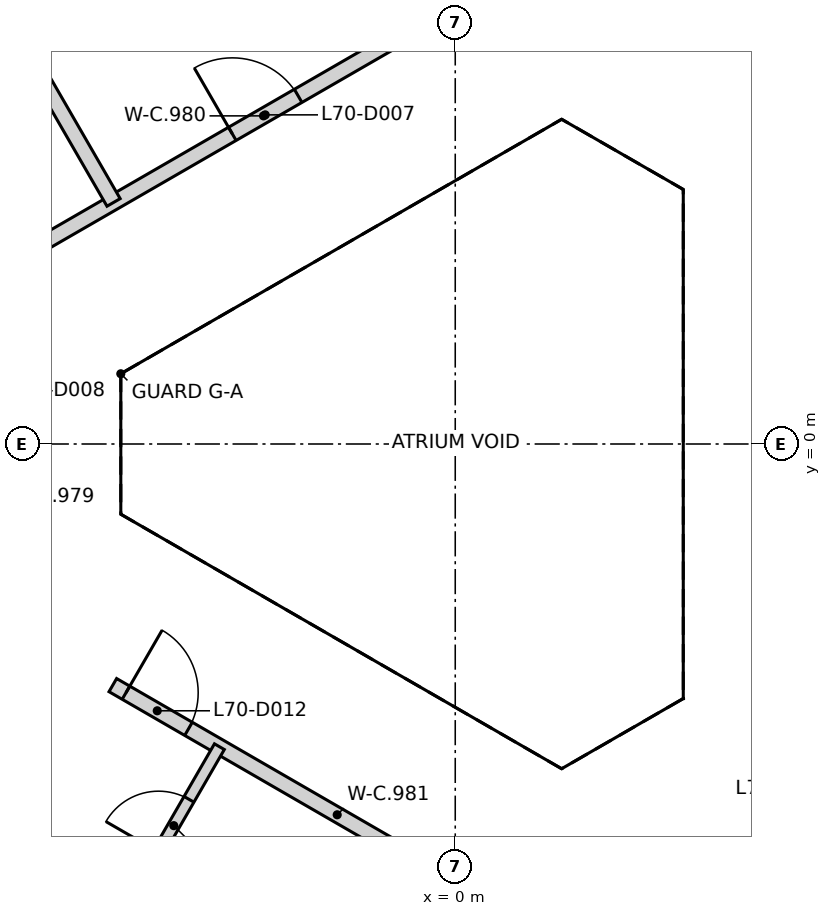
"""IFC4 building model, lengths in metres.
Left out: names, types, materials, properties, quantities, classifications, styles, units other than length and angle.
Written with IfcOpenShell. Run it as: python <this file> out.ifc"""

import sys

from ifc_helpers import new_model, si_unit, direction, frame, frame_2d, origin, place, context, subcontext, project, spatial, rectangle, extrude, element, fill, save


model = new_model("IFC4")
c1 = context("Model", 3, precision=1e-05, world=origin(), true_north=direction((0.0, 1.0)))
c2 = subcontext(c1, "Body", "Model", "MODEL_VIEW")
j1 = project(units=[si_unit("LENGTHUNIT", "METRE"), si_unit("PLANEANGLEUNIT", "RADIAN")], contexts=[c1])
p1 = place(None, origin())
s1 = spatial("IfcSite", under=j1, at=p1, CompositionType="ELEMENT")
p2 = place(p1, origin())
s2 = spatial("IfcBuilding", under=s1, at=p2, CompositionType="ELEMENT")
p3 = place(p2, frame((0.0, 0.0, 276.6)))
s3 = spatial("IfcBuildingStorey", under=s2, at=p3, CompositionType="ELEMENT", Elevation=276.6)
p4 = place(p3, frame((-6.4, 2.079, 0.0), z_axis=(0.0, 0.0, 1.0), x_axis=(0.866044821263, 0.499966366432, 0.0)))
e1 = element("IfcWall", 1, at=p4, inside=s3, PredefinedType="PARTITIONING", context=c2, shape_type="SweptSolid", body=[
    extrude(rectangle(XDim=8.953, YDim=0.2, at=frame_2d((4.477, 0.0))), origin(), (0.0, 0.0, 1.0), 3.25),
])
p5 = place(p4, frame((4.003, 0.0, 0.0)))
e2 = element("IfcOpeningElement", 2, at=p5, cuts=e1, PredefinedType="OPENING", context=c2, shape_type="SweptSolid", body=[
    extrude(rectangle(XDim=1.0, YDim=2.1, at=frame_2d((0.5, 1.05))), frame((0.0, 0.11, 0.0), z_axis=(0.0, -1.0, 0.0), x_axis=(1.0, 0.0, 0.0)), (0.0, 0.0, 1.0), 0.22),
])
p6 = place(p3, frame((-4.505, -3.172, 0.0), z_axis=(0.0, 0.0, 1.0), x_axis=(0.865815783666, -0.500362897061, 0.0)))
e3 = element("IfcWall", 3, at=p6, inside=s3, PredefinedType="PARTITIONING", context=c2, shape_type="SweptSolid", body=[
    extrude(rectangle(XDim=6.819, YDim=0.2, at=frame_2d((3.409, 0.0))), origin(), (0.0, 0.0, 1.0), 3.25),
])
p7 = place(p6, frame((0.2, 0.0, 0.0)))
e4 = element("IfcOpeningElement", 4, at=p7, cuts=e3, PredefinedType="OPENING", context=c2, shape_type="SweptSolid", body=[
    extrude(rectangle(XDim=0.95, YDim=2.1, at=frame_2d((0.475, 1.05))), frame((0.0, 0.11, 0.0), z_axis=(0.0, -1.0, 0.0), x_axis=(1.0, 0.0, 0.0)), (0.0, 0.0, 1.0), 0.22),
])
p8 = place(p3, frame((-11.035, 14.505, 0.0), z_axis=(0.0, 0.0, 1.0), x_axis=(0.499989597041, -0.866031409852, 0.0)))
e5 = element("IfcWall", 5, at=p8, inside=s3, PredefinedType="PARTITIONING", context=c2, shape_type="SweptSolid", body=[
    extrude(rectangle(XDim=13.079, YDim=0.2, at=frame_2d((6.54, 0.0))), origin(), (0.0, 0.0, 1.0), 3.25),
])
p9 = place(p3, frame((-4.303, -6.06, 0.0), z_axis=(0.0, 0.0, 1.0), x_axis=(0.500045362686, 0.865999212041, 0.0)))
e6 = element("IfcWall", 6, at=p9, inside=s3, PredefinedType="PARTITIONING", context=c2, shape_type="SweptSolid", body=[
    extrude(rectangle(XDim=2.4, YDim=0.15, at=frame_2d((1.2, 0.0))), origin(), (0.0, 0.0, 1.0), 3.25),
])
p10 = place(p9, frame((0.8, 0.0, 0.0)))
e7 = element("IfcOpeningElement", 7, at=p10, cuts=e6, PredefinedType="OPENING", context=c2, shape_type="SweptSolid", body=[
    extrude(rectangle(XDim=0.8, YDim=2.1, at=frame_2d((0.4, 1.05))), frame((0.0, 0.085, 0.0), z_axis=(0.0, -1.0, 0.0), x_axis=(1.0, 0.0, 0.0)), (0.0, 0.0, 1.0), 0.17),
])
p11 = place(p5, origin())
e8 = element("IfcDoor", 8, at=p11, inside=s3, OperationType="SINGLE_SWING_LEFT", PredefinedType="DOOR", context=c2, shape_type="SweptSolid", body=[
    extrude(rectangle(XDim=1.0, YDim=2.1, at=frame_2d((0.5, 1.05))), frame((0.0, 0.025, 0.0), z_axis=(0.0, -1.0, 0.0), x_axis=(1.0, 0.0, 0.0)), (0.0, 0.0, 1.0), 0.05),
])
fill(e2, e8)
p12 = place(p7, frame((0.95, 0.0, 0.0), z_axis=(0.0, 0.0, 1.0), x_axis=(-1.0, 0.0, 0.0)))
e9 = element("IfcDoor", 9, at=p12, inside=s3, OperationType="SINGLE_SWING_LEFT", PredefinedType="DOOR", context=c2, shape_type="SweptSolid", body=[
    extrude(rectangle(XDim=0.95, YDim=2.1, at=frame_2d((0.475, 1.05))), frame((0.0, 0.025, 0.0), z_axis=(0.0, -1.0, 0.0), x_axis=(1.0, 0.0, 0.0)), (0.0, 0.0, 1.0), 0.05),
])
fill(e4, e9)
p13 = place(p10, frame((0.8, 0.0, 0.0), z_axis=(0.0, 0.0, 1.0), x_axis=(-1.0, 0.0, 0.0)))
e10 = element("IfcDoor", 10, at=p13, inside=s3, OperationType="SINGLE_SWING_LEFT", PredefinedType="DOOR", context=c2, shape_type="SweptSolid", body=[
    extrude(rectangle(XDim=0.8, YDim=2.1, at=frame_2d((0.4, 1.05))), frame((0.0, 0.025, 0.0), z_axis=(0.0, -1.0, 0.0), x_axis=(1.0, 0.0, 0.0)), (0.0, 0.0, 1.0), 0.05),
])
fill(e7, e10)
save(model, sys.argv[1])
